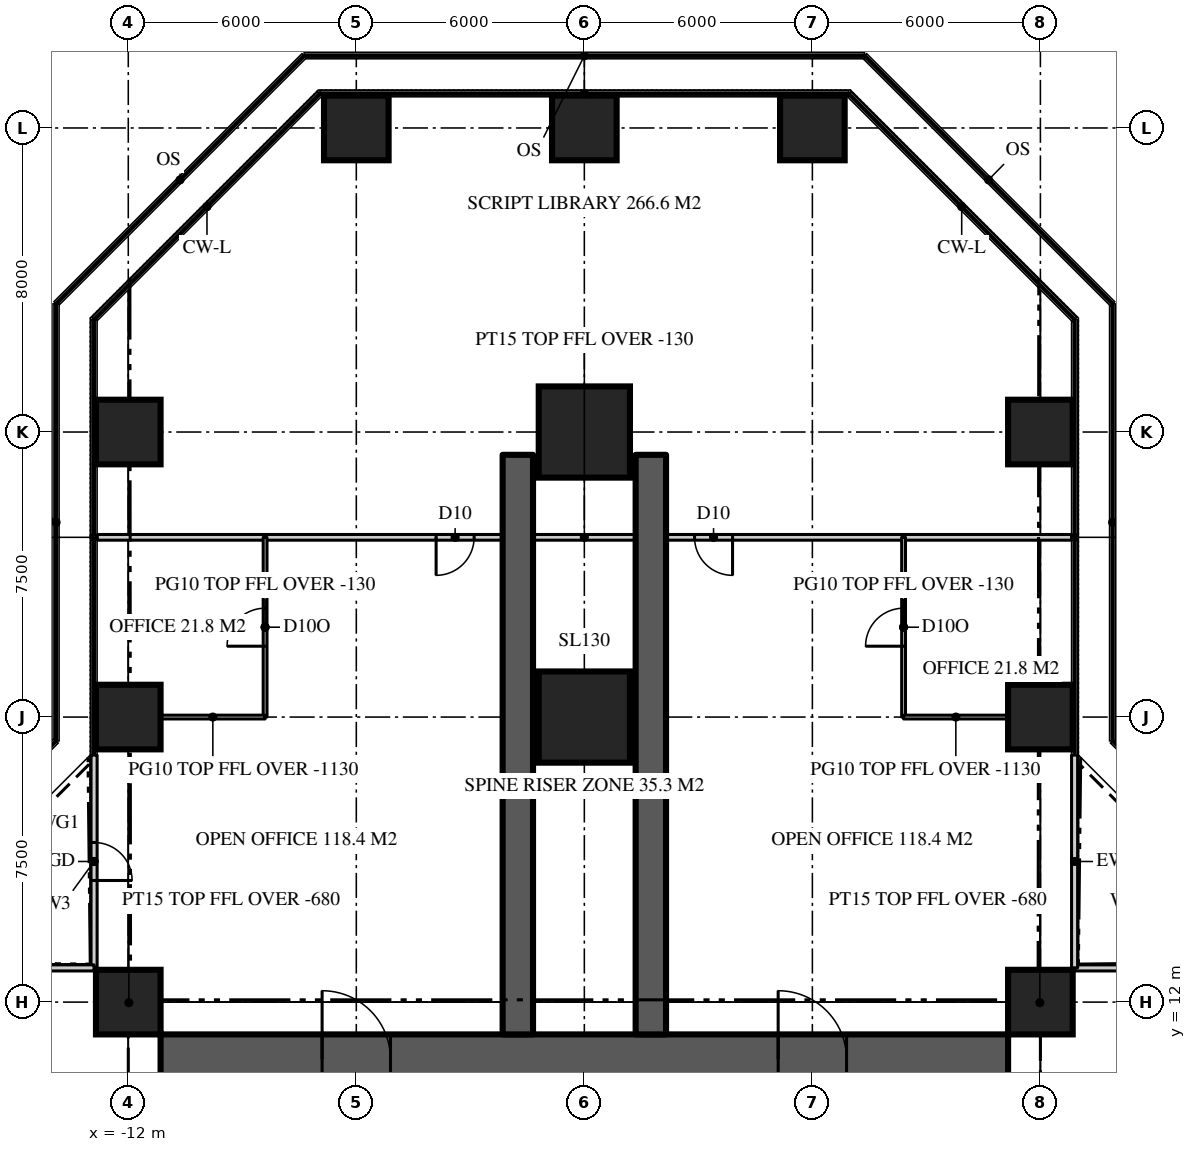
"""IFC4 building model, lengths in metres.
Left out: names, types, materials, properties, quantities, classifications, styles, units other than length and angle.
Written with IfcOpenShell. Run it as: python <this file> out.ifc"""

import sys

from ifc_helpers import new_model, si_unit, direction, frame, frame_2d, origin, origin_2d, place, context, subcontext, project, spatial, rectangle, extrude, element, fill, save


model = new_model("IFC4")
c1 = context("Model", 3, precision=1e-05, world=origin(), true_north=direction((0.0, 1.0)))
c2 = subcontext(c1, "Body", "Model", "MODEL_VIEW")
j1 = project(units=[si_unit("LENGTHUNIT", "METRE"), si_unit("PLANEANGLEUNIT", "RADIAN")], contexts=[c1])
p1 = place(None, origin())
s1 = spatial("IfcSite", under=j1, at=p1, CompositionType="ELEMENT")
p2 = place(p1, origin())
s2 = spatial("IfcBuilding", under=s1, at=p2, CompositionType="ELEMENT")
p3 = place(p2, frame((0.0, 0.0, 86.4)))
s3 = spatial("IfcBuildingStorey", under=s2, at=p3, CompositionType="ELEMENT", Elevation=86.4)
p4 = place(p3, frame((-11.15, 10.5, 0.0), z_axis=(0.0, 0.0, 1.0), x_axis=(1.0, 0.0, 0.0)))
e1 = element("IfcWall", 1, at=p4, inside=s3, PredefinedType="SHEAR", context=c2, shape_type="SweptSolid", body=[
    extrude(rectangle(XDim=22.3, YDim=1.3, at=frame_2d((11.15, 0.0))), origin(), (0.0, 0.0, 1.0), 3.9),
])
p5 = place(p4, frame((4.25, 0.0, 0.0)))
e2 = element("IfcOpeningElement", 2, at=p5, cuts=e1, PredefinedType="OPENING", context=c2, shape_type="SweptSolid", body=[
    extrude(rectangle(XDim=1.8, YDim=2.2, at=frame_2d((0.9, 1.1))), frame((0.0, 0.66, 0.0), z_axis=(0.0, -1.0, 0.0), x_axis=(1.0, 0.0, 0.0)), (0.0, 0.0, 1.0), 1.32),
])
p6 = place(p4, frame((16.25, 0.0, 0.0)))
e3 = element("IfcOpeningElement", 3, at=p6, cuts=e1, PredefinedType="OPENING", context=c2, shape_type="SweptSolid", body=[
    extrude(rectangle(XDim=1.8, YDim=2.2, at=frame_2d((0.9, 1.1))), frame((0.0, 0.66, 0.0), z_axis=(0.0, -1.0, 0.0), x_axis=(1.0, 0.0, 0.0)), (0.0, 0.0, 1.0), 1.32),
])
for number, where, z_axis, x_axis in (
    (4, (1.75, 11.15, 0.0), (0.0, 0.0, 1.0), (0.0, 1.0, 0.0)),
    (5, (-1.75, 11.15, 0.0), (0.0, 0.0, 1.0), (0.0, 1.0, 0.0)),
):
    element("IfcWall", number, at=place(p3, frame(where, z_axis=z_axis, x_axis=x_axis)), inside=s3, PredefinedType="SHEAR", context=c2, shape_type="SweptSolid", body=[
        extrude(rectangle(XDim=15.25, YDim=0.8, at=frame_2d((7.625, 0.0))), origin(), (0.0, 0.0, 1.0), 3.9),
    ])
for number, where, z_axis, x_axis in (
    (6, (-12.0, 12.0, 0.0), (0.0, 0.0, 1.0), (1.0, 0.0, 0.0)),
    (7, (12.0, 12.0, 0.0), (0.0, 0.0, 1.0), (1.0, 0.0, 0.0)),
    (8, (-12.0, 19.5, 0.0), (0.0, 0.0, 1.0), (1.0, 0.0, 0.0)),
):
    element("IfcColumn", number, at=place(p3, frame(where, z_axis=z_axis, x_axis=x_axis)), inside=s3, PredefinedType="COLUMN", context=c2, shape_type="SweptSolid", body=[
        extrude(rectangle(XDim=1.7, YDim=1.7, at=origin_2d()), origin(), (0.0, 0.0, 1.0), 3.9),
    ])
p7 = place(p3, frame((0.0, 19.5, 0.0), z_axis=(0.0, 0.0, 1.0), x_axis=(1.0, 0.0, 0.0)))
e9 = element("IfcColumn", 9, at=p7, inside=s3, PredefinedType="COLUMN", context=c2, shape_type="SweptSolid", body=[
    extrude(rectangle(XDim=2.4, YDim=2.4, at=origin_2d()), origin(), (0.0, 0.0, 1.0), 3.9),
])
for number, where, z_axis, x_axis in (
    (10, (12.0, 19.5, 0.0), (0.0, 0.0, 1.0), (1.0, 0.0, 0.0)),
    (11, (-12.0, 27.0, 0.0), (0.0, 0.0, 1.0), (1.0, 0.0, 0.0)),
):
    element("IfcColumn", number, at=place(p3, frame(where, z_axis=z_axis, x_axis=x_axis)), inside=s3, PredefinedType="COLUMN", context=c2, shape_type="SweptSolid", body=[
        extrude(rectangle(XDim=1.7, YDim=1.7, at=origin_2d()), origin(), (0.0, 0.0, 1.0), 3.9),
    ])
p8 = place(p3, frame((0.0, 27.0, 0.0), z_axis=(0.0, 0.0, 1.0), x_axis=(1.0, 0.0, 0.0)))
e12 = element("IfcColumn", 12, at=p8, inside=s3, PredefinedType="COLUMN", context=c2, shape_type="SweptSolid", body=[
    extrude(rectangle(XDim=2.4, YDim=2.4, at=origin_2d()), origin(), (0.0, 0.0, 1.0), 3.9),
])
for number, where, z_axis, x_axis in (
    (13, (12.0, 27.0, 0.0), (0.0, 0.0, 1.0), (1.0, 0.0, 0.0)),
    (14, (-6.0, 35.0, 0.0), (0.0, 0.0, 1.0), (1.0, 0.0, 0.0)),
    (15, (0.0, 35.0, 0.0), (0.0, 0.0, 1.0), (1.0, 0.0, 0.0)),
    (16, (6.0, 35.0, 0.0), (0.0, 0.0, 1.0), (1.0, 0.0, 0.0)),
):
    element("IfcColumn", number, at=place(p3, frame(where, z_axis=z_axis, x_axis=x_axis)), inside=s3, PredefinedType="COLUMN", context=c2, shape_type="SweptSolid", body=[
        extrude(rectangle(XDim=1.7, YDim=1.7, at=origin_2d()), origin(), (0.0, 0.0, 1.0), 3.9),
    ])
p9 = place(p3, frame((18.5, 12.9, 0.0), z_axis=(0.0, 0.0, 1.0), x_axis=(-1.0, 0.0, 0.0)))
e17 = element("IfcWall", 17, at=p9, inside=s3, PredefinedType="SOLIDWALL", context=c2, shape_type="SweptSolid", body=[
    extrude(rectangle(XDim=5.6, YDim=0.16, at=frame_2d((2.8, 0.0))), origin(), (0.0, 0.0, 1.0), 3.77),
])
p10 = place(p9, frame((2.3, 0.0, 0.0)))
e18 = element("IfcOpeningElement", 18, at=p10, cuts=e17, PredefinedType="OPENING", context=c2, shape_type="SweptSolid", body=[
    extrude(rectangle(XDim=1.0, YDim=2.2, at=frame_2d((0.5, 1.1))), frame((0.0, 0.09, 0.0), z_axis=(0.0, -1.0, 0.0), x_axis=(1.0, 0.0, 0.0)), (0.0, 0.0, 1.0), 0.18),
])
p11 = place(p3, frame((12.9, 12.9, 0.0), z_axis=(0.0, 0.0, 1.0), x_axis=(0.0, 1.0, 0.0)))
e19 = element("IfcWall", 19, at=p11, inside=s3, PredefinedType="SOLIDWALL", context=c2, shape_type="SweptSolid", body=[
    extrude(rectangle(XDim=5.6, YDim=0.16, at=frame_2d((2.8, 0.0))), origin(), (0.0, 0.0, 1.0), 3.77),
])
p12 = place(p3, frame((-12.9, 18.5, 0.0), z_axis=(0.0, 0.0, 1.0), x_axis=(0.0, -1.0, 0.0)))
e20 = element("IfcWall", 20, at=p12, inside=s3, PredefinedType="SOLIDWALL", context=c2, shape_type="SweptSolid", body=[
    extrude(rectangle(XDim=5.6, YDim=0.16, at=frame_2d((2.8, 0.0))), origin(), (0.0, 0.0, 1.0), 3.77),
])
p13 = place(p12, frame((2.3, 0.0, 0.0)))
e21 = element("IfcOpeningElement", 21, at=p13, cuts=e20, PredefinedType="OPENING", context=c2, shape_type="SweptSolid", body=[
    extrude(rectangle(XDim=1.0, YDim=2.2, at=frame_2d((0.5, 1.1))), frame((0.0, 0.09, 0.0), z_axis=(0.0, -1.0, 0.0), x_axis=(1.0, 0.0, 0.0)), (0.0, 0.0, 1.0), 0.18),
])
p14 = place(p3, frame((-12.9, 12.9, 0.0), z_axis=(0.0, 0.0, 1.0), x_axis=(-1.0, 0.0, 0.0)))
e22 = element("IfcWall", 22, at=p14, inside=s3, PredefinedType="SOLIDWALL", context=c2, shape_type="SweptSolid", body=[
    extrude(rectangle(XDim=5.6, YDim=0.16, at=frame_2d((2.8, 0.0))), origin(), (0.0, 0.0, 1.0), 3.77),
])
p15 = place(p3, frame((12.82, 24.229, 0.0), z_axis=(0.0, 0.0, 1.0), x_axis=(-1.0, 0.0, 0.0)))
e23 = element("IfcWall", 23, at=p15, inside=s3, PredefinedType="PARTITIONING", context=c2, shape_type="SweptSolid", body=[
    extrude(rectangle(XDim=25.64, YDim=0.15, at=frame_2d((12.82, 0.0))), origin(), (0.0, 0.0, 1.0), 3.77),
])
p16 = place(p15, frame((15.72, 0.0, 0.0)))
e24 = element("IfcOpeningElement", 24, at=p16, cuts=e23, PredefinedType="OPENING", context=c2, shape_type="SweptSolid", body=[
    extrude(rectangle(XDim=1.0, YDim=2.2, at=frame_2d((0.5, 1.1))), frame((0.0, 0.085, 0.0), z_axis=(0.0, -1.0, 0.0), x_axis=(1.0, 0.0, 0.0)), (0.0, 0.0, 1.0), 0.17),
])
p17 = place(p15, frame((8.92, 0.0, 0.0)))
e25 = element("IfcOpeningElement", 25, at=p17, cuts=e23, PredefinedType="OPENING", context=c2, shape_type="SweptSolid", body=[
    extrude(rectangle(XDim=1.0, YDim=2.2, at=frame_2d((0.5, 1.1))), frame((0.0, 0.085, 0.0), z_axis=(0.0, -1.0, 0.0), x_axis=(1.0, 0.0, 0.0)), (0.0, 0.0, 1.0), 0.17),
])
p18 = place(p3, frame((-8.4, 19.5, 0.0), z_axis=(0.0, 0.0, 1.0), x_axis=(0.0, 1.0, 0.0)))
e26 = element("IfcWall", 26, at=p18, inside=s3, PredefinedType="PARTITIONING", context=c2, shape_type="SweptSolid", body=[
    extrude(rectangle(XDim=4.729, YDim=0.1, at=frame_2d((2.365, 0.0))), origin(), (0.0, 0.0, 1.0), 3.77),
])
p19 = place(p18, frame((1.865, 0.0, 0.0)))
e27 = element("IfcOpeningElement", 27, at=p19, cuts=e26, PredefinedType="OPENING", context=c2, shape_type="SweptSolid", body=[
    extrude(rectangle(XDim=1.0, YDim=2.2, at=frame_2d((0.5, 1.1))), frame((0.0, 0.06, 0.0), z_axis=(0.0, -1.0, 0.0), x_axis=(1.0, 0.0, 0.0)), (0.0, 0.0, 1.0), 0.12),
])
p20 = place(p3, frame((-8.4, 19.5, 0.0), z_axis=(0.0, 0.0, 1.0), x_axis=(-1.0, 0.0, 0.0)))
e28 = element("IfcWall", 28, at=p20, inside=s3, PredefinedType="PARTITIONING", context=c2, shape_type="SweptSolid", body=[
    extrude(rectangle(XDim=2.75, YDim=0.1, at=frame_2d((1.375, 0.0))), origin(), (0.0, 0.0, 1.0), 2.77),
])
p21 = place(p3, frame((8.4, 19.5, 0.0), z_axis=(0.0, 0.0, 1.0), x_axis=(0.0, 1.0, 0.0)))
e29 = element("IfcWall", 29, at=p21, inside=s3, PredefinedType="PARTITIONING", context=c2, shape_type="SweptSolid", body=[
    extrude(rectangle(XDim=4.729, YDim=0.1, at=frame_2d((2.365, 0.0))), origin(), (0.0, 0.0, 1.0), 3.77),
])
p22 = place(p21, frame((1.865, 0.0, 0.0)))
e30 = element("IfcOpeningElement", 30, at=p22, cuts=e29, PredefinedType="OPENING", context=c2, shape_type="SweptSolid", body=[
    extrude(rectangle(XDim=1.0, YDim=2.2, at=frame_2d((0.5, 1.1))), frame((0.0, 0.06, 0.0), z_axis=(0.0, -1.0, 0.0), x_axis=(1.0, 0.0, 0.0)), (0.0, 0.0, 1.0), 0.12),
])
p23 = place(p3, frame((8.4, 19.5, 0.0), z_axis=(0.0, 0.0, 1.0), x_axis=(1.0, 0.0, 0.0)))
e31 = element("IfcWall", 31, at=p23, inside=s3, PredefinedType="PARTITIONING", context=c2, shape_type="SweptSolid", body=[
    extrude(rectangle(XDim=2.75, YDim=0.1, at=frame_2d((1.375, 0.0))), origin(), (0.0, 0.0, 1.0), 2.77),
])
for number, where, z_axis, x_axis in (
    (32, (11.15, 11.15, 0.0), (0.0, 0.0, 1.0), (0.707, 0.707, 0.0)),
    (33, (-11.15, 11.15, 0.0), (0.0, 0.0, 1.0), (-0.707, 0.707, 0.0)),
):
    element("IfcWall", number, at=place(p3, frame(where, z_axis=z_axis, x_axis=x_axis)), inside=s3, PredefinedType="PARTITIONING", context=c2, shape_type="SweptSolid", body=[
        extrude(rectangle(XDim=2.362, YDim=0.15, at=frame_2d((1.181, 0.0))), origin(), (0.0, 0.0, 1.0), 3.22),
    ])
p24 = place(p13, origin())
e34 = element("IfcDoor", 34, at=p24, inside=s3, OperationType="SINGLE_SWING_RIGHT", PredefinedType="DOOR", context=c2, shape_type="SweptSolid", body=[
    extrude(rectangle(XDim=1.0, YDim=2.2, at=frame_2d((0.5, 1.1))), frame((0.0, 0.025, 0.0), z_axis=(0.0, -1.0, 0.0), x_axis=(1.0, 0.0, 0.0)), (0.0, 0.0, 1.0), 0.05),
])
fill(e21, e34)
p25 = place(p5, origin())
e35 = element("IfcDoor", 35, at=p25, inside=s3, OperationType="DOUBLE_DOOR_DOUBLE_SWING", PredefinedType="DOOR", context=c2, shape_type="SweptSolid", body=[
    extrude(rectangle(XDim=1.8, YDim=2.2, at=frame_2d((0.9, 1.1))), frame((0.0, 0.025, 0.0), z_axis=(0.0, -1.0, 0.0), x_axis=(1.0, 0.0, 0.0)), (0.0, 0.0, 1.0), 0.05),
])
fill(e2, e35)
p26 = place(p6, origin())
e36 = element("IfcDoor", 36, at=p26, inside=s3, OperationType="DOUBLE_DOOR_DOUBLE_SWING", PredefinedType="DOOR", context=c2, shape_type="SweptSolid", body=[
    extrude(rectangle(XDim=1.8, YDim=2.2, at=frame_2d((0.9, 1.1))), frame((0.0, 0.025, 0.0), z_axis=(0.0, -1.0, 0.0), x_axis=(1.0, 0.0, 0.0)), (0.0, 0.0, 1.0), 0.05),
])
fill(e3, e36)
p27 = place(p16, origin())
e37 = element("IfcDoor", 37, at=p27, inside=s3, OperationType="SINGLE_SWING_RIGHT", PredefinedType="DOOR", context=c2, shape_type="SweptSolid", body=[
    extrude(rectangle(XDim=1.0, YDim=2.2, at=frame_2d((0.5, 1.1))), frame((0.0, 0.025, 0.0), z_axis=(0.0, -1.0, 0.0), x_axis=(1.0, 0.0, 0.0)), (0.0, 0.0, 1.0), 0.05),
])
fill(e24, e37)
p28 = place(p17, origin())
e38 = element("IfcDoor", 38, at=p28, inside=s3, OperationType="SINGLE_SWING_LEFT", PredefinedType="DOOR", context=c2, shape_type="SweptSolid", body=[
    extrude(rectangle(XDim=1.0, YDim=2.2, at=frame_2d((0.5, 1.1))), frame((0.0, 0.025, 0.0), z_axis=(0.0, -1.0, 0.0), x_axis=(1.0, 0.0, 0.0)), (0.0, 0.0, 1.0), 0.05),
])
fill(e25, e38)
p29 = place(p19, origin())
e39 = element("IfcDoor", 39, at=p29, inside=s3, OperationType="SINGLE_SWING_LEFT", PredefinedType="DOOR", context=c2, shape_type="SweptSolid", body=[
    extrude(rectangle(XDim=1.0, YDim=2.2, at=frame_2d((0.5, 1.1))), frame((0.0, 0.025, 0.0), z_axis=(0.0, -1.0, 0.0), x_axis=(1.0, 0.0, 0.0)), (0.0, 0.0, 1.0), 0.05),
])
fill(e27, e39)
p30 = place(p22, origin())
e40 = element("IfcDoor", 40, at=p30, inside=s3, OperationType="SINGLE_SWING_LEFT", PredefinedType="DOOR", context=c2, shape_type="SweptSolid", body=[
    extrude(rectangle(XDim=1.0, YDim=2.2, at=frame_2d((0.5, 1.1))), frame((0.0, 0.025, 0.0), z_axis=(0.0, -1.0, 0.0), x_axis=(1.0, 0.0, 0.0)), (0.0, 0.0, 1.0), 0.05),
])
fill(e30, e40)
save(model, sys.argv[1])
